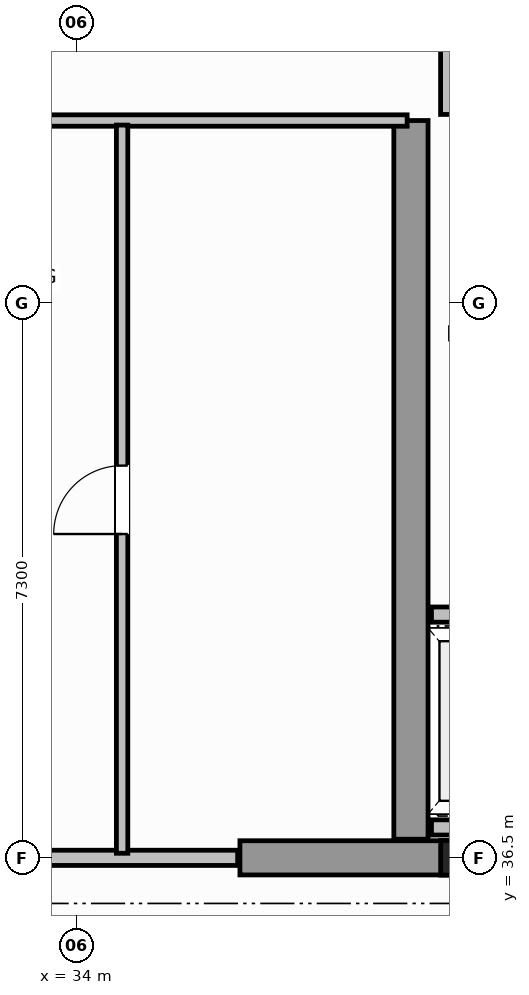
"""IFC4 building model, lengths in metres.
Left out: names, types, materials, properties, quantities, classifications, styles, units other than length and angle.
Written with IfcOpenShell. Run it as: python <this file> out.ifc"""

import sys

from ifc_helpers import new_model, si_unit, direction, frame, frame_2d, origin, origin_2d, place, context, subcontext, project, spatial, rectangle, i_section, extrude, source, transform, mapped, element, fill, save


model = new_model("IFC4")
c1 = context("Model", 3, precision=1e-05, world=origin(), true_north=direction((0.0, 1.0)))
c2 = subcontext(c1, "Body", "Model", "MODEL_VIEW")
j1 = project(units=[si_unit("LENGTHUNIT", "METRE"), si_unit("PLANEANGLEUNIT", "RADIAN")], contexts=[c1])
p1 = place(None, origin())
s1 = spatial("IfcSite", under=j1, at=p1, CompositionType="ELEMENT")
p2 = place(p1, origin())
s2 = spatial("IfcBuilding", under=s1, at=p2, CompositionType="ELEMENT")
p3 = place(p2, frame((0.0, 0.0, 246.0)))
s3 = spatial("IfcBuildingStorey", under=s2, at=p3, CompositionType="ELEMENT", Elevation=246.0)
m1 = source(origin(), c2, "Body", "SweptSolid", [
    extrude(i_section(OverallWidth=0.418, OverallDepth=0.455, WebThickness=0.042, FlangeThickness=0.058, FilletRadius=0.015, at=origin_2d()), origin(), (0.0, 0.0, 1.0), 3.8),
])
p4 = place(p3, frame((39.0, 36.5, 0.0), z_axis=(0.0, 0.0, 1.0), x_axis=(1.0, 0.0, 0.0)))
e1 = element("IfcColumn", 1, at=p4, inside=s3, PredefinedType="COLUMN", context=c2, shape_type="MappedRepresentation", body=[
    mapped(m1, transform((0.0, 0.0, 0.0), scale=1.0)),
])
p5 = place(p3, frame((36.15, 36.5, 0.0), z_axis=(0.0, 0.0, 1.0), x_axis=(1.0, 0.0, 0.0)))
e2 = element("IfcWall", 2, at=p5, inside=s3, PredefinedType="SHEAR", context=c2, shape_type="SweptSolid", body=[
    extrude(rectangle(XDim=4.5, YDim=0.45, at=frame_2d((2.25, 0.0))), origin(), (0.0, 0.0, 1.0), 3.8),
])
p6 = place(p3, frame((38.4, 36.745, 0.0), z_axis=(0.0, 0.0, 1.0), x_axis=(0.0, 1.0, 0.0)))
e3 = element("IfcWall", 3, at=p6, inside=s3, PredefinedType="SHEAR", context=c2, shape_type="SweptSolid", body=[
    extrude(rectangle(XDim=9.455, YDim=0.45, at=frame_2d((4.728, 0.0))), origin(), (0.0, 0.0, 1.0), 3.8),
])
p7 = place(p3, frame((38.67, 39.7, 0.0), z_axis=(0.0, 0.0, 1.0), x_axis=(1.0, 0.0, 0.0)))
e4 = element("IfcWall", 4, at=p7, inside=s3, PredefinedType="SOLIDWALL", context=c2, shape_type="SweptSolid", body=[
    extrude(rectangle(XDim=1.96, YDim=0.2, at=frame_2d((0.98, 0.0))), origin(), (0.0, 0.0, 1.0), 3.58),
])
p8 = place(p7, frame((0.43, 0.0, 0.0)))
e5 = element("IfcOpeningElement", 5, at=p8, cuts=e4, PredefinedType="OPENING", context=c2, shape_type="SweptSolid", body=[
    extrude(rectangle(XDim=1.1, YDim=2.15, at=frame_2d((0.55, 1.075))), frame((0.0, 0.11, 0.0), z_axis=(0.0, -1.0, 0.0), x_axis=(1.0, 0.0, 0.0)), (0.0, 0.0, 1.0), 0.22),
])
p9 = place(p3, frame((38.67, 36.9, 0.0), z_axis=(0.0, 0.0, 1.0), x_axis=(1.0, 0.0, 0.0)))
e6 = element("IfcWall", 6, at=p9, inside=s3, PredefinedType="SOLIDWALL", context=c2, shape_type="SweptSolid", body=[
    extrude(rectangle(XDim=1.96, YDim=0.2, at=frame_2d((0.98, 0.0))), origin(), (0.0, 0.0, 1.0), 3.58),
])
p10 = place(p3, frame((32.08, 36.5, 0.0), z_axis=(0.0, 0.0, 1.0), x_axis=(1.0, 0.0, 0.0)))
e7 = element("IfcWall", 7, at=p10, inside=s3, PredefinedType="SOLIDWALL", context=c2, shape_type="SweptSolid", body=[
    extrude(rectangle(XDim=4.04, YDim=0.2, at=frame_2d((2.02, 0.0))), origin(), (0.0, 0.0, 1.0), 3.02),
])
p11 = place(p10, frame((0.45, 0.0, 0.0)))
e8 = element("IfcOpeningElement", 8, at=p11, cuts=e7, PredefinedType="OPENING", context=c2, shape_type="SweptSolid", body=[
    extrude(rectangle(XDim=1.1, YDim=2.15, at=frame_2d((0.55, 1.075))), frame((0.0, 0.11, 0.0), z_axis=(0.0, -1.0, 0.0), x_axis=(1.0, 0.0, 0.0)), (0.0, 0.0, 1.0), 0.22),
])
p12 = place(p3, frame((29.85, 46.2, 0.0), z_axis=(0.0, 0.0, 1.0), x_axis=(1.0, 0.0, 0.0)))
e9 = element("IfcWall", 9, at=p12, inside=s3, PredefinedType="PARTITIONING", context=c2, shape_type="SweptSolid", body=[
    extrude(rectangle(XDim=8.5, YDim=0.15, at=frame_2d((4.25, 0.0))), origin(), (0.0, 0.0, 1.0), 3.58),
])
p13 = place(p3, frame((34.6, 36.56, 0.0), z_axis=(0.0, 0.0, 1.0), x_axis=(0.0, 1.0, 0.0)))
e10 = element("IfcWall", 10, at=p13, inside=s3, PredefinedType="PARTITIONING", context=c2, shape_type="SweptSolid", body=[
    extrude(rectangle(XDim=9.58, YDim=0.15, at=frame_2d((4.79, 0.0))), origin(), (0.0, 0.0, 1.0), 3.58),
])
p14 = place(p13, frame((4.2, 0.0, 0.0)))
e11 = element("IfcOpeningElement", 11, at=p14, cuts=e10, PredefinedType="OPENING", context=c2, shape_type="SweptSolid", body=[
    extrude(rectangle(XDim=0.9, YDim=2.1, at=frame_2d((0.45, 1.05))), frame((0.0, 0.085, 0.0), z_axis=(0.0, -1.0, 0.0), x_axis=(1.0, 0.0, 0.0)), (0.0, 0.0, 1.0), 0.17),
])
p15 = place(p3, frame((38.88, 46.28, 0.0), z_axis=(0.0, 0.0, 1.0), x_axis=(0.0, 1.0, 0.0)))
e12 = element("IfcWall", 12, at=p15, inside=s3, PredefinedType="PLUMBINGWALL", context=c2, shape_type="SweptSolid", body=[
    extrude(rectangle(XDim=1.94, YDim=0.18, at=frame_2d((0.97, 0.0))), origin(), (0.0, 0.0, 1.0), 3.58),
])
m2 = source(origin(), c2, "Body", "SweptSolid", [
    extrude(rectangle(XDim=0.9, YDim=2.1, at=frame_2d((0.45, 1.05))), frame((0.0, 0.025, 0.0), z_axis=(0.0, -1.0, 0.0), x_axis=(1.0, 0.0, 0.0)), (0.0, 0.0, 1.0), 0.05),
])
p16 = place(p14, origin())
e13 = element("IfcDoor", 13, at=p16, inside=s3, OperationType="SINGLE_SWING_RIGHT", PredefinedType="DOOR", context=c2, shape_type="MappedRepresentation", body=[
    mapped(m2, transform((0.0, 0.0, 0.0), scale=1.0)),
])
fill(e11, e13)
save(model, sys.argv[1])
